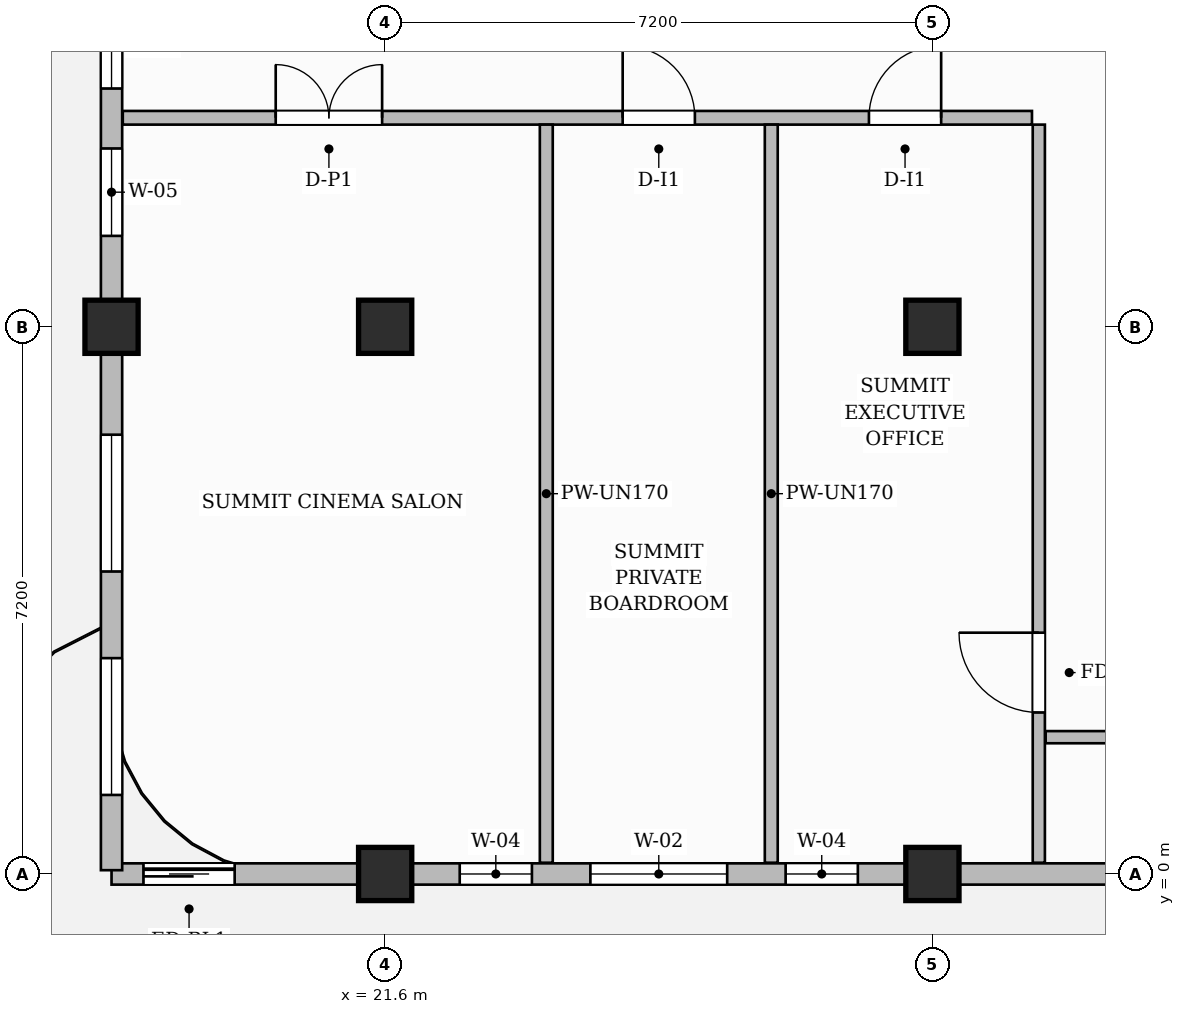
"""IFC4 building model, lengths in metres.
Left out: names, types, materials, properties, quantities, classifications, styles, units other than length and angle.
Written with IfcOpenShell. Run it as: python <this file> out.ifc"""

import sys

from ifc_helpers import new_model, si_unit, direction, frame, frame_2d, origin, origin_2d, place, context, subcontext, project, spatial, rectangle, extrude, source, transform, mapped, element, fill, save


model = new_model("IFC4")
c1 = context("Model", 3, precision=1e-05, world=origin(), true_north=direction((0.0, 1.0)))
c2 = subcontext(c1, "Body", "Model", "MODEL_VIEW")
j1 = project(units=[si_unit("LENGTHUNIT", "METRE"), si_unit("PLANEANGLEUNIT", "RADIAN")], contexts=[c1])
p1 = place(None, origin())
s1 = spatial("IfcSite", under=j1, at=p1, CompositionType="ELEMENT")
p2 = place(p1, origin())
s2 = spatial("IfcBuilding", under=s1, at=p2, CompositionType="ELEMENT")
p3 = place(p2, frame((0.0, 0.0, 282.75)))
s3 = spatial("IfcBuildingStorey", under=s2, at=p3, CompositionType="ELEMENT", Elevation=282.75)
m1 = source(origin(), c2, "Body", "SweptSolid", [
    extrude(rectangle(XDim=0.7, YDim=0.7, at=origin_2d()), origin(), (0.0, 0.0, 1.0), 3.85),
])
for number, where, z_axis, x_axis in (
    (1, (21.6, 0.0, 0.0), (0.0, 0.0, 1.0), (1.0, 0.0, 0.0)),
    (2, (21.6, 7.2, 0.0), (0.0, 0.0, 1.0), (1.0, 0.0, 0.0)),
    (3, (28.8, 0.0, 0.0), (0.0, 0.0, 1.0), (1.0, 0.0, 0.0)),
    (4, (28.8, 7.2, 0.0), (0.0, 0.0, 1.0), (1.0, 0.0, 0.0)),
    (5, (18.0, 7.2, 0.0), (0.0, 0.0, 1.0), (1.0, 0.0, 0.0)),
):
    element("IfcColumn", number, at=place(p3, frame(where, z_axis=z_axis, x_axis=x_axis)), inside=s3, PredefinedType="COLUMN", context=c2, shape_type="MappedRepresentation", body=[
        mapped(m1, transform((0.0, 0.0, 0.0), scale=1.0)),
    ])
p4 = place(p3, frame((18.148, 9.95, 0.0), z_axis=(0.0, 0.0, 1.0), x_axis=(1.0, 0.0, 0.0)))
e6 = element("IfcWall", 6, at=p4, inside=s3, PredefinedType="PARTITIONING", context=c2, shape_type="SweptSolid", body=[
    extrude(rectangle(XDim=11.962, YDim=0.18, at=frame_2d((5.981, 0.0))), origin(), (0.0, 0.0, 1.0), 3.6),
])
p5 = place(p4, frame((2.012, 0.0, 0.0)))
e7 = element("IfcOpeningElement", 7, at=p5, cuts=e6, PredefinedType="OPENING", context=c2, shape_type="SweptSolid", body=[
    extrude(rectangle(XDim=1.4, YDim=2.35, at=frame_2d((0.7, 1.175))), frame((0.0, 0.1, 0.0), z_axis=(0.0, -1.0, 0.0), x_axis=(1.0, 0.0, 0.0)), (0.0, 0.0, 1.0), 0.2),
])
p6 = place(p4, frame((6.577, 0.0, 0.0)))
e8 = element("IfcOpeningElement", 8, at=p6, cuts=e6, PredefinedType="OPENING", context=c2, shape_type="SweptSolid", body=[
    extrude(rectangle(XDim=0.95, YDim=2.15, at=frame_2d((0.475, 1.075))), frame((0.0, 0.1, 0.0), z_axis=(0.0, -1.0, 0.0), x_axis=(1.0, 0.0, 0.0)), (0.0, 0.0, 1.0), 0.2),
])
p7 = place(p4, frame((9.817, 0.0, 0.0)))
e9 = element("IfcOpeningElement", 9, at=p7, cuts=e6, PredefinedType="OPENING", context=c2, shape_type="SweptSolid", body=[
    extrude(rectangle(XDim=0.95, YDim=2.15, at=frame_2d((0.475, 1.075))), frame((0.0, 0.1, 0.0), z_axis=(0.0, -1.0, 0.0), x_axis=(1.0, 0.0, 0.0)), (0.0, 0.0, 1.0), 0.2),
])
p8 = place(p3, frame((30.2, 0.148, 0.0), z_axis=(0.0, 0.0, 1.0), x_axis=(0.0, 1.0, 0.0)))
e10 = element("IfcWall", 10, at=p8, inside=s3, PredefinedType="PARTITIONING", context=c2, shape_type="SweptSolid", body=[
    extrude(rectangle(XDim=9.712, YDim=0.16, at=frame_2d((4.856, 0.0))), origin(), (0.0, 0.0, 1.0), 3.6),
])
p9 = place(p8, frame((1.977, 0.0, 0.0)))
e11 = element("IfcOpeningElement", 11, at=p9, cuts=e10, PredefinedType="OPENING", context=c2, shape_type="SweptSolid", body=[
    extrude(rectangle(XDim=1.05, YDim=2.15, at=frame_2d((0.525, 1.075))), frame((0.0, 0.09, 0.0), z_axis=(0.0, -1.0, 0.0), x_axis=(1.0, 0.0, 0.0)), (0.0, 0.0, 1.0), 0.18),
])
p10 = place(p3, frame((30.29, 1.8, 0.0), z_axis=(0.0, 0.0, 1.0), x_axis=(1.0, 0.0, 0.0)))
e12 = element("IfcWall", 12, at=p10, inside=s3, PredefinedType="PARTITIONING", context=c2, shape_type="SweptSolid", body=[
    extrude(rectangle(XDim=19.37, YDim=0.16, at=frame_2d((9.685, 0.0))), origin(), (0.0, 0.0, 1.0), 3.6),
])
p11 = place(p10, frame((9.735, 0.0, 0.0)))
e13 = element("IfcOpeningElement", 13, at=p11, cuts=e12, PredefinedType="OPENING", context=c2, shape_type="SweptSolid", body=[
    extrude(rectangle(XDim=0.95, YDim=2.15, at=frame_2d((0.475, 1.075))), frame((0.0, 0.09, 0.0), z_axis=(0.0, -1.0, 0.0), x_axis=(1.0, 0.0, 0.0)), (0.0, 0.0, 1.0), 0.18),
])
for number, where, z_axis, x_axis in (
    (14, (23.72, 0.148, 0.0), (0.0, 0.0, 1.0), (0.0, 1.0, 0.0)),
    (15, (26.68, 0.148, 0.0), (0.0, 0.0, 1.0), (0.0, 1.0, 0.0)),
):
    element("IfcWall", number, at=place(p3, frame(where, z_axis=z_axis, x_axis=x_axis)), inside=s3, PredefinedType="PARTITIONING", context=c2, shape_type="SweptSolid", body=[
        extrude(rectangle(XDim=9.712, YDim=0.17, at=frame_2d((4.856, 0.0))), origin(), (0.0, 0.0, 1.0), 3.6),
    ])
p12 = place(p3, frame((18.0, 0.0, 0.0), z_axis=(0.0, 0.0, 1.0), x_axis=(1.0, 0.0, 0.0)))
e16 = element("IfcWall", 16, at=p12, inside=s3, PredefinedType="SOLIDWALL", context=c2, shape_type="SweptSolid", body=[
    extrude(rectangle(XDim=31.8, YDim=0.28, at=frame_2d((15.9, 0.0))), origin(), (0.0, 0.0, 1.0), 3.185),
])
p13 = place(p12, frame((0.42, 0.0, 0.0)))
e17 = element("IfcOpeningElement", 17, at=p13, cuts=e16, PredefinedType="OPENING", context=c2, shape_type="SweptSolid", body=[
    extrude(rectangle(XDim=1.2, YDim=2.2, at=frame_2d((0.6, 1.1))), frame((0.0, 0.15, 0.0), z_axis=(0.0, -1.0, 0.0), x_axis=(1.0, 0.0, 0.0)), (0.0, 0.0, 1.0), 0.3),
])
p14 = place(p12, frame((4.581, 0.0, 0.8)))
e18 = element("IfcOpeningElement", 18, at=p14, cuts=e16, PredefinedType="OPENING", context=c2, shape_type="SweptSolid", body=[
    extrude(rectangle(XDim=0.95, YDim=1.75, at=frame_2d((0.475, 0.875))), frame((0.0, 0.15, 0.0), z_axis=(0.0, -1.0, 0.0), x_axis=(1.0, 0.0, 0.0)), (0.0, 0.0, 1.0), 0.3),
])
p15 = place(p12, frame((6.3, 0.0, 0.8)))
e19 = element("IfcOpeningElement", 19, at=p15, cuts=e16, PredefinedType="OPENING", context=c2, shape_type="SweptSolid", body=[
    extrude(rectangle(XDim=1.8, YDim=1.85, at=frame_2d((0.9, 0.925))), frame((0.0, 0.15, 0.0), z_axis=(0.0, -1.0, 0.0), x_axis=(1.0, 0.0, 0.0)), (0.0, 0.0, 1.0), 0.3),
])
p16 = place(p12, frame((8.869, 0.0, 0.8)))
e20 = element("IfcOpeningElement", 20, at=p16, cuts=e16, PredefinedType="OPENING", context=c2, shape_type="SweptSolid", body=[
    extrude(rectangle(XDim=0.95, YDim=1.75, at=frame_2d((0.475, 0.875))), frame((0.0, 0.15, 0.0), z_axis=(0.0, -1.0, 0.0), x_axis=(1.0, 0.0, 0.0)), (0.0, 0.0, 1.0), 0.3),
])
p17 = place(p12, frame((13.204, 0.0, 0.8)))
e21 = element("IfcOpeningElement", 21, at=p17, cuts=e16, PredefinedType="OPENING", context=c2, shape_type="SweptSolid", body=[
    extrude(rectangle(XDim=1.8, YDim=1.85, at=frame_2d((0.9, 0.925))), frame((0.0, 0.15, 0.0), z_axis=(0.0, -1.0, 0.0), x_axis=(1.0, 0.0, 0.0)), (0.0, 0.0, 1.0), 0.3),
])
p18 = place(p12, frame((18.125, 0.0, 0.8)))
e22 = element("IfcOpeningElement", 22, at=p18, cuts=e16, PredefinedType="OPENING", context=c2, shape_type="SweptSolid", body=[
    extrude(rectangle(XDim=1.8, YDim=1.85, at=frame_2d((0.9, 0.925))), frame((0.0, 0.15, 0.0), z_axis=(0.0, -1.0, 0.0), x_axis=(1.0, 0.0, 0.0)), (0.0, 0.0, 1.0), 0.3),
])
p19 = place(p12, frame((20.875, 0.0, 0.8)))
e23 = element("IfcOpeningElement", 23, at=p19, cuts=e16, PredefinedType="OPENING", context=c2, shape_type="SweptSolid", body=[
    extrude(rectangle(XDim=1.8, YDim=1.85, at=frame_2d((0.9, 0.925))), frame((0.0, 0.15, 0.0), z_axis=(0.0, -1.0, 0.0), x_axis=(1.0, 0.0, 0.0)), (0.0, 0.0, 1.0), 0.3),
])
p20 = place(p12, frame((25.475, 0.0, 0.8)))
e24 = element("IfcOpeningElement", 24, at=p20, cuts=e16, PredefinedType="OPENING", context=c2, shape_type="SweptSolid", body=[
    extrude(rectangle(XDim=1.8, YDim=1.85, at=frame_2d((0.9, 0.925))), frame((0.0, 0.15, 0.0), z_axis=(0.0, -1.0, 0.0), x_axis=(1.0, 0.0, 0.0)), (0.0, 0.0, 1.0), 0.3),
])
p21 = place(p12, frame((28.525, 0.0, 0.8)))
e25 = element("IfcOpeningElement", 25, at=p21, cuts=e16, PredefinedType="OPENING", context=c2, shape_type="SweptSolid", body=[
    extrude(rectangle(XDim=1.8, YDim=1.85, at=frame_2d((0.9, 0.925))), frame((0.0, 0.15, 0.0), z_axis=(0.0, -1.0, 0.0), x_axis=(1.0, 0.0, 0.0)), (0.0, 0.0, 1.0), 0.3),
])
p22 = place(p3, frame((18.0, 0.05, 0.0), z_axis=(0.0, 0.0, 1.0), x_axis=(0.0, 1.0, 0.0)))
e26 = element("IfcWall", 26, at=p22, inside=s3, PredefinedType="SOLIDWALL", context=c2, shape_type="SweptSolid", body=[
    extrude(rectangle(XDim=21.5, YDim=0.28, at=frame_2d((10.75, 0.0))), origin(), (0.0, 0.0, 1.0), 3.6),
])
p23 = place(p22, frame((0.99, 0.0, 0.8)))
e27 = element("IfcOpeningElement", 27, at=p23, cuts=e26, PredefinedType="OPENING", context=c2, shape_type="SweptSolid", body=[
    extrude(rectangle(XDim=1.8, YDim=1.85, at=frame_2d((0.9, 0.925))), frame((0.0, 0.15, 0.0), z_axis=(0.0, -1.0, 0.0), x_axis=(1.0, 0.0, 0.0)), (0.0, 0.0, 1.0), 0.3),
])
p24 = place(p22, frame((3.93, 0.0, 0.8)))
e28 = element("IfcOpeningElement", 28, at=p24, cuts=e26, PredefinedType="OPENING", context=c2, shape_type="SweptSolid", body=[
    extrude(rectangle(XDim=1.8, YDim=1.85, at=frame_2d((0.9, 0.925))), frame((0.0, 0.15, 0.0), z_axis=(0.0, -1.0, 0.0), x_axis=(1.0, 0.0, 0.0)), (0.0, 0.0, 1.0), 0.3),
])
p25 = place(p22, frame((8.346, 0.0, 0.8)))
e29 = element("IfcOpeningElement", 29, at=p25, cuts=e26, PredefinedType="OPENING", context=c2, shape_type="SweptSolid", body=[
    extrude(rectangle(XDim=1.15, YDim=1.8, at=frame_2d((0.575, 0.9))), frame((0.0, 0.15, 0.0), z_axis=(0.0, -1.0, 0.0), x_axis=(1.0, 0.0, 0.0)), (0.0, 0.0, 1.0), 0.3),
])
p26 = place(p22, frame((10.285, 0.0, 0.8)))
e30 = element("IfcOpeningElement", 30, at=p26, cuts=e26, PredefinedType="OPENING", context=c2, shape_type="SweptSolid", body=[
    extrude(rectangle(XDim=1.15, YDim=1.8, at=frame_2d((0.575, 0.9))), frame((0.0, 0.15, 0.0), z_axis=(0.0, -1.0, 0.0), x_axis=(1.0, 0.0, 0.0)), (0.0, 0.0, 1.0), 0.3),
])
p27 = place(p22, frame((12.114, 0.0, 0.8)))
e31 = element("IfcOpeningElement", 31, at=p27, cuts=e26, PredefinedType="OPENING", context=c2, shape_type="SweptSolid", body=[
    extrude(rectangle(XDim=1.15, YDim=1.8, at=frame_2d((0.575, 0.9))), frame((0.0, 0.15, 0.0), z_axis=(0.0, -1.0, 0.0), x_axis=(1.0, 0.0, 0.0)), (0.0, 0.0, 1.0), 0.3),
])
p28 = place(p22, frame((15.406, 0.0, 0.8)))
e32 = element("IfcOpeningElement", 32, at=p28, cuts=e26, PredefinedType="OPENING", context=c2, shape_type="SweptSolid", body=[
    extrude(rectangle(XDim=1.15, YDim=1.8, at=frame_2d((0.575, 0.9))), frame((0.0, 0.15, 0.0), z_axis=(0.0, -1.0, 0.0), x_axis=(1.0, 0.0, 0.0)), (0.0, 0.0, 1.0), 0.3),
])
p29 = place(p22, frame((18.079, 0.0, 0.8)))
e33 = element("IfcOpeningElement", 33, at=p29, cuts=e26, PredefinedType="OPENING", context=c2, shape_type="SweptSolid", body=[
    extrude(rectangle(XDim=1.8, YDim=1.85, at=frame_2d((0.9, 0.925))), frame((0.0, 0.15, 0.0), z_axis=(0.0, -1.0, 0.0), x_axis=(1.0, 0.0, 0.0)), (0.0, 0.0, 1.0), 0.3),
])
m2 = source(origin(), c2, "Body", "SweptSolid", [
    extrude(rectangle(XDim=1.05, YDim=2.15, at=frame_2d((0.525, 1.075))), frame((0.0, 0.025, 0.0), z_axis=(0.0, -1.0, 0.0), x_axis=(1.0, 0.0, 0.0)), (0.0, 0.0, 1.0), 0.05),
])
p30 = place(p9, origin())
e34 = element("IfcDoor", 34, at=p30, inside=s3, OperationType="SINGLE_SWING_RIGHT", PredefinedType="DOOR", context=c2, shape_type="MappedRepresentation", body=[
    mapped(m2, transform((0.0, 0.0, 0.0), scale=1.0)),
])
fill(e11, e34)
m3 = source(origin(), c2, "Body", "SweptSolid", [
    extrude(rectangle(XDim=1.4, YDim=2.35, at=frame_2d((0.7, 1.175))), frame((0.0, 0.025, 0.0), z_axis=(0.0, -1.0, 0.0), x_axis=(1.0, 0.0, 0.0)), (0.0, 0.0, 1.0), 0.05),
])
p31 = place(p5, origin())
e35 = element("IfcDoor", 35, at=p31, inside=s3, OperationType="DOUBLE_DOOR_SINGLE_SWING", PredefinedType="DOOR", context=c2, shape_type="MappedRepresentation", body=[
    mapped(m3, transform((0.0, 0.0, 0.0), scale=1.0)),
])
fill(e7, e35)
m4 = source(origin(), c2, "Body", "SweptSolid", [
    extrude(rectangle(XDim=0.95, YDim=2.15, at=frame_2d((0.475, 1.075))), frame((0.0, 0.025, 0.0), z_axis=(0.0, -1.0, 0.0), x_axis=(1.0, 0.0, 0.0)), (0.0, 0.0, 1.0), 0.05),
])
p32 = place(p6, origin())
e36 = element("IfcDoor", 36, at=p32, inside=s3, OperationType="SINGLE_SWING_LEFT", PredefinedType="DOOR", context=c2, shape_type="MappedRepresentation", body=[
    mapped(m4, transform((0.0, 0.0, 0.0), scale=1.0)),
])
fill(e8, e36)
p33 = place(p7, origin())
e37 = element("IfcDoor", 37, at=p33, inside=s3, OperationType="SINGLE_SWING_RIGHT", PredefinedType="DOOR", context=c2, shape_type="MappedRepresentation", body=[
    mapped(m4, transform((0.0, 0.0, 0.0), scale=1.0)),
])
fill(e9, e37)
m5 = source(origin(), c2, "Body", "SweptSolid", [
    extrude(rectangle(XDim=1.2, YDim=2.2, at=frame_2d((0.6, 1.1))), frame((0.0, 0.025, 0.0), z_axis=(0.0, -1.0, 0.0), x_axis=(1.0, 0.0, 0.0)), (0.0, 0.0, 1.0), 0.05),
])
p34 = place(p13, origin())
e38 = element("IfcDoor", 38, at=p34, inside=s3, OperationType="SLIDING_TO_LEFT", PredefinedType="DOOR", context=c2, shape_type="MappedRepresentation", body=[
    mapped(m5, transform((0.0, 0.0, 0.0), scale=1.0)),
])
fill(e17, e38)
m6 = source(origin(), c2, "Body", "SweptSolid", [
    extrude(rectangle(XDim=0.95, YDim=1.75, at=frame_2d((0.475, 0.875))), frame((0.0, 0.03, 0.0), z_axis=(0.0, -1.0, 0.0), x_axis=(1.0, 0.0, 0.0)), (0.0, 0.0, 1.0), 0.06),
])
p35 = place(p14, origin())
e39 = element("IfcWindow", 39, at=p35, inside=s3, PartitioningType="SINGLE_PANEL", PredefinedType="WINDOW", context=c2, shape_type="MappedRepresentation", body=[
    mapped(m6, transform((0.0, 0.0, 0.0), scale=1.0)),
])
fill(e18, e39)
m7 = source(origin(), c2, "Body", "SweptSolid", [
    extrude(rectangle(XDim=1.8, YDim=1.85, at=frame_2d((0.9, 0.925))), frame((0.0, 0.03, 0.0), z_axis=(0.0, -1.0, 0.0), x_axis=(1.0, 0.0, 0.0)), (0.0, 0.0, 1.0), 0.06),
])
p36 = place(p15, origin())
e40 = element("IfcWindow", 40, at=p36, inside=s3, PartitioningType="DOUBLE_PANEL_VERTICAL", PredefinedType="WINDOW", context=c2, shape_type="MappedRepresentation", body=[
    mapped(m7, transform((0.0, 0.0, 0.0), scale=1.0)),
])
fill(e19, e40)
p37 = place(p16, origin())
e41 = element("IfcWindow", 41, at=p37, inside=s3, PartitioningType="SINGLE_PANEL", PredefinedType="WINDOW", context=c2, shape_type="MappedRepresentation", body=[
    mapped(m6, transform((0.0, 0.0, 0.0), scale=1.0)),
])
fill(e20, e41)
p38 = place(p23, origin())
e42 = element("IfcWindow", 42, at=p38, inside=s3, PartitioningType="DOUBLE_PANEL_VERTICAL", PredefinedType="WINDOW", context=c2, shape_type="MappedRepresentation", body=[
    mapped(m7, transform((0.0, 0.0, 0.0), scale=1.0)),
])
fill(e27, e42)
p39 = place(p24, origin())
e43 = element("IfcWindow", 43, at=p39, inside=s3, PartitioningType="DOUBLE_PANEL_VERTICAL", PredefinedType="WINDOW", context=c2, shape_type="MappedRepresentation", body=[
    mapped(m7, transform((0.0, 0.0, 0.0), scale=1.0)),
])
fill(e28, e43)
m8 = source(origin(), c2, "Body", "SweptSolid", [
    extrude(rectangle(XDim=1.15, YDim=1.8, at=frame_2d((0.575, 0.9))), frame((0.0, 0.03, 0.0), z_axis=(0.0, -1.0, 0.0), x_axis=(1.0, 0.0, 0.0)), (0.0, 0.0, 1.0), 0.06),
])
p40 = place(p25, origin())
e44 = element("IfcWindow", 44, at=p40, inside=s3, PartitioningType="SINGLE_PANEL", PredefinedType="WINDOW", context=c2, shape_type="MappedRepresentation", body=[
    mapped(m8, transform((0.0, 0.0, 0.0), scale=1.0)),
])
fill(e29, e44)
p41 = place(p26, origin())
e45 = element("IfcWindow", 45, at=p41, inside=s3, PartitioningType="SINGLE_PANEL", PredefinedType="WINDOW", context=c2, shape_type="MappedRepresentation", body=[
    mapped(m8, transform((0.0, 0.0, 0.0), scale=1.0)),
])
fill(e30, e45)
save(model, sys.argv[1])
